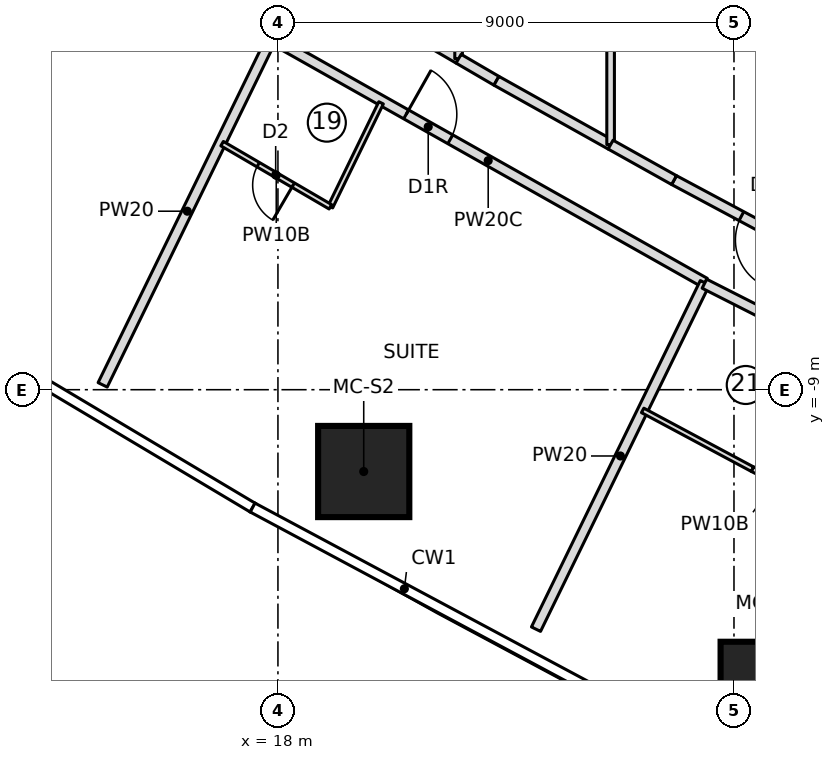
"""IFC4 building model, lengths in metres.
Left out: names, types, materials, properties, quantities, classifications, styles, units other than length and angle.
Written with IfcOpenShell. Run it as: python <this file> out.ifc"""

import sys

from ifc_helpers import new_model, si_unit, direction, frame, frame_2d, origin, origin_2d, place, context, subcontext, project, spatial, rectangle, extrude, element, fill, save


model = new_model("IFC4")
c1 = context("Model", 3, precision=1e-05, world=origin(), true_north=direction((0.0, 1.0)))
c2 = subcontext(c1, "Body", "Model", "MODEL_VIEW")
j1 = project(units=[si_unit("LENGTHUNIT", "METRE"), si_unit("PLANEANGLEUNIT", "RADIAN")], contexts=[c1])
p1 = place(None, origin())
s1 = spatial("IfcSite", under=j1, at=p1, CompositionType="ELEMENT")
p2 = place(p1, origin())
s2 = spatial("IfcBuilding", under=s1, at=p2, CompositionType="ELEMENT")
p3 = place(p2, frame((0.0, 0.0, 60.9)))
s3 = spatial("IfcBuildingStorey", under=s2, at=p3, CompositionType="ELEMENT", Elevation=60.9)
for number, where, z_axis, x_axis in (
    (1, (19.693, -10.615, 0.0), (0.0, 0.0, 1.0), (1.0, 0.0, 0.0)),
    (2, (27.635, -14.874, 0.0), (0.0, 0.0, 1.0), (1.0, 0.0, 0.0)),
):
    element("IfcColumn", number, at=place(p3, frame(where, z_axis=z_axis, x_axis=x_axis)), inside=s3, PredefinedType="COLUMN", context=c2, shape_type="SweptSolid", body=[
        extrude(rectangle(XDim=1.8, YDim=1.8, at=origin_2d()), origin(), (0.0, 0.0, 1.0), 3.55),
    ])
p4 = place(p3, frame((14.541, -8.904, 0.0), z_axis=(0.0, 0.0, 1.0), x_axis=(0.438213564788, 0.898870887078, 0.0)))
e3 = element("IfcWall", 3, at=p4, inside=s3, PredefinedType="PARTITIONING", context=c2, shape_type="SweptSolid", body=[
    extrude(rectangle(XDim=7.625, YDim=0.2, at=frame_2d((3.813, 0.0))), origin(), (0.0, 0.0, 1.0), 3.25),
])
p5 = place(p3, frame((17.874, -2.068, 0.0), z_axis=(0.0, 0.0, 1.0), x_axis=(0.871078318876, -0.491144136057, 0.0)))
e4 = element("IfcWall", 4, at=p5, inside=s3, PredefinedType="PARTITIONING", context=c2, shape_type="SweptSolid", body=[
    extrude(rectangle(XDim=9.817, YDim=0.2, at=frame_2d((4.909, 0.0))), origin(), (0.0, 0.0, 1.0), 3.25),
])
p6 = place(p5, frame((3.05, 0.0, 0.0)))
e5 = element("IfcOpeningElement", 5, at=p6, cuts=e4, PredefinedType="OPENING", context=c2, shape_type="SweptSolid", body=[
    extrude(rectangle(XDim=1.0, YDim=2.1, at=frame_2d((0.5, 1.05))), frame((0.0, 0.11, 0.0), z_axis=(0.0, -1.0, 0.0), x_axis=(1.0, 0.0, 0.0)), (0.0, 0.0, 1.0), 0.22),
])
p7 = place(p3, frame((20.035, -3.338, 0.0), z_axis=(0.0, 0.0, 1.0), x_axis=(-0.438122322582, -0.898915363344, 0.0)))
e6 = element("IfcWall", 6, at=p7, inside=s3, PredefinedType="PARTITIONING", context=c2, shape_type="SweptSolid", body=[
    extrude(rectangle(XDim=2.283, YDim=0.1, at=frame_2d((1.142, 0.0))), origin(), (0.0, 0.0, 1.0), 3.25),
])
p8 = place(p3, frame((19.035, -5.39, 0.0), z_axis=(0.0, 0.0, 1.0), x_axis=(-0.863707305865, 0.503993739837, 0.0)))
e7 = element("IfcWall", 7, at=p8, inside=s3, PredefinedType="PARTITIONING", context=c2, shape_type="SweptSolid", body=[
    extrude(rectangle(XDim=2.474, YDim=0.1, at=frame_2d((1.237, 0.0))), origin(), (0.0, 0.0, 1.0), 3.25),
])
p9 = place(p8, frame((0.85, 0.0, 0.0)))
e8 = element("IfcOpeningElement", 8, at=p9, cuts=e7, PredefinedType="OPENING", context=c2, shape_type="SweptSolid", body=[
    extrude(rectangle(XDim=0.8, YDim=2.1, at=frame_2d((0.4, 1.05))), frame((0.0, 0.06, 0.0), z_axis=(0.0, -1.0, 0.0), x_axis=(1.0, 0.0, 0.0)), (0.0, 0.0, 1.0), 0.12),
])
p10 = place(p3, frame((23.093, -13.726, 0.0), z_axis=(0.0, 0.0, 1.0), x_axis=(0.438202895602, 0.898876088394, 0.0)))
e9 = element("IfcWall", 9, at=p10, inside=s3, PredefinedType="PARTITIONING", context=c2, shape_type="SweptSolid", body=[
    extrude(rectangle(XDim=7.605, YDim=0.2, at=frame_2d((3.803, 0.0))), origin(), (0.0, 0.0, 1.0), 3.25),
])
p11 = place(p3, frame((26.417, -6.908, 0.0), z_axis=(0.0, 0.0, 1.0), x_axis=(0.891700643128, -0.452625632334, 0.0)))
e10 = element("IfcWall", 10, at=p11, inside=s3, PredefinedType="PARTITIONING", context=c2, shape_type="SweptSolid", body=[
    extrude(rectangle(XDim=9.801, YDim=0.2, at=frame_2d((4.901, 0.0))), origin(), (0.0, 0.0, 1.0), 3.25),
])
p12 = place(p11, frame((3.7, 0.0, 0.0)))
e11 = element("IfcOpeningElement", 11, at=p12, cuts=e10, PredefinedType="OPENING", context=c2, shape_type="SweptSolid", body=[
    extrude(rectangle(XDim=1.0, YDim=2.1, at=frame_2d((0.5, 1.05))), frame((0.0, 0.11, 0.0), z_axis=(0.0, -1.0, 0.0), x_axis=(1.0, 0.0, 0.0)), (0.0, 0.0, 1.0), 0.22),
])
p13 = place(p3, frame((28.027, -10.907, 0.0), z_axis=(0.0, 0.0, 1.0), x_axis=(-0.890195653003, 0.455578422858, 0.0)))
e12 = element("IfcWall", 12, at=p13, inside=s3, PredefinedType="PARTITIONING", context=c2, shape_type="SweptSolid", body=[
    extrude(rectangle(XDim=0.745, YDim=0.1, at=frame_2d((0.373, 0.0))), origin(), (0.0, 0.0, 1.0), 3.25),
])
p14 = place(p3, frame((27.363, -10.568, 0.0), z_axis=(0.0, 0.0, 1.0), x_axis=(-0.881658684569, 0.471887660279, 0.0)))
e13 = element("IfcWall", 13, at=p14, inside=s3, PredefinedType="PARTITIONING", context=c2, shape_type="SweptSolid", body=[
    extrude(rectangle(XDim=2.457, YDim=0.1, at=frame_2d((1.228, 0.0))), origin(), (0.0, 0.0, 1.0), 3.25),
])
p15 = place(p3, frame((21.565, -2.467, 0.0), z_axis=(0.0, 0.0, 1.0), x_axis=(-0.86371145221, 0.503986634071, 0.0)))
e14 = element("IfcWall", 14, at=p15, inside=s3, PredefinedType="PARTITIONING", context=c2, shape_type="SweptSolid", body=[
    extrude(rectangle(XDim=3.151, YDim=0.2, at=frame_2d((1.576, 0.0))), origin(), (0.0, 0.0, 1.0), 3.25),
])
p16 = place(p3, frame((21.565, -2.467, 0.0), z_axis=(0.0, 0.0, 1.0), x_axis=(0.0, 1.0, 0.0)))
e15 = element("IfcWall", 15, at=p16, inside=s3, PredefinedType="PARTITIONING", context=c2, shape_type="SweptSolid", body=[
    extrude(rectangle(XDim=4.935, YDim=0.15, at=frame_2d((2.467, 0.0))), origin(), (0.0, 0.0, 1.0), 3.25),
])
p17 = place(p3, frame((22.312, -2.903, 0.0), z_axis=(0.0, 0.0, 1.0), x_axis=(-0.863707207562, 0.503993908303, 0.0)))
e16 = element("IfcWall", 16, at=p17, inside=s3, PredefinedType="PARTITIONING", context=c2, shape_type="SweptSolid", body=[
    extrude(rectangle(XDim=0.865, YDim=0.2, at=frame_2d((0.432, 0.0))), origin(), (0.0, 0.0, 1.0), 3.25),
])
p18 = place(p3, frame((24.565, -4.163, 0.0), z_axis=(0.0, 0.0, 1.0), x_axis=(-0.872797752414, 0.488082045748, 0.0)))
e17 = element("IfcWall", 17, at=p18, inside=s3, PredefinedType="PARTITIONING", context=c2, shape_type="SweptSolid", body=[
    extrude(rectangle(XDim=2.582, YDim=0.2, at=frame_2d((1.291, 0.0))), origin(), (0.0, 0.0, 1.0), 3.25),
])
p19 = place(p3, frame((24.565, -4.163, 0.0), z_axis=(0.0, 0.0, 1.0), x_axis=(0.0, 1.0, 0.0)))
e18 = element("IfcWall", 18, at=p19, inside=s3, PredefinedType="PARTITIONING", context=c2, shape_type="SweptSolid", body=[
    extrude(rectangle(XDim=8.326, YDim=0.15, at=frame_2d((4.163, 0.0))), origin(), (0.0, 0.0, 1.0), 3.25),
])
p20 = place(p3, frame((29.357, -6.758, 0.0), z_axis=(0.0, 0.0, 1.0), x_axis=(-0.881655245922, 0.471894084874, 0.0)))
e19 = element("IfcWall", 19, at=p20, inside=s3, PredefinedType="PARTITIONING", context=c2, shape_type="SweptSolid", body=[
    extrude(rectangle(XDim=4.016, YDim=0.2, at=frame_2d((2.008, 0.0))), origin(), (0.0, 0.0, 1.0), 3.25),
])
p21 = place(p20, frame((1.508, 0.0, 0.0)))
e20 = element("IfcOpeningElement", 20, at=p21, cuts=e19, PredefinedType="OPENING", context=c2, shape_type="SweptSolid", body=[
    extrude(rectangle(XDim=1.0, YDim=2.1, at=frame_2d((0.5, 1.05))), frame((0.0, 0.11, 0.0), z_axis=(0.0, -1.0, 0.0), x_axis=(1.0, 0.0, 0.0)), (0.0, 0.0, 1.0), 0.22),
])
p22 = place(p3, frame((25.817, -4.863, 0.0), z_axis=(0.0, 0.0, 1.0), x_axis=(-0.872804855849, 0.488069343031, 0.0)))
e21 = element("IfcWall", 21, at=p22, inside=s3, PredefinedType="PARTITIONING", context=c2, shape_type="SweptSolid", body=[
    extrude(rectangle(XDim=1.434, YDim=0.2, at=frame_2d((0.717, 0.0))), origin(), (0.0, 0.0, 1.0), 3.25),
])
p23 = place(p9, origin())
e22 = element("IfcDoor", 22, at=p23, inside=s3, OperationType="SINGLE_SWING_LEFT", PredefinedType="DOOR", context=c2, shape_type="SweptSolid", body=[
    extrude(rectangle(XDim=0.8, YDim=2.1, at=frame_2d((0.4, 1.05))), frame((0.0, 0.025, 0.0), z_axis=(0.0, -1.0, 0.0), x_axis=(1.0, 0.0, 0.0)), (0.0, 0.0, 1.0), 0.05),
])
fill(e8, e22)
p24 = place(p6, origin())
e23 = element("IfcDoor", 23, at=p24, inside=s3, OperationType="SINGLE_SWING_RIGHT", PredefinedType="DOOR", context=c2, shape_type="SweptSolid", body=[
    extrude(rectangle(XDim=1.0, YDim=2.1, at=frame_2d((0.5, 1.05))), frame((0.0, 0.025, 0.0), z_axis=(0.0, -1.0, 0.0), x_axis=(1.0, 0.0, 0.0)), (0.0, 0.0, 1.0), 0.05),
])
fill(e5, e23)
p25 = place(p21, origin())
e24 = element("IfcDoor", 24, at=p25, inside=s3, OperationType="SINGLE_SWING_LEFT", PredefinedType="DOOR", context=c2, shape_type="SweptSolid", body=[
    extrude(rectangle(XDim=1.0, YDim=2.1, at=frame_2d((0.5, 1.05))), frame((0.0, 0.025, 0.0), z_axis=(0.0, -1.0, 0.0), x_axis=(1.0, 0.0, 0.0)), (0.0, 0.0, 1.0), 0.05),
])
fill(e20, e24)
save(model, sys.argv[1])
